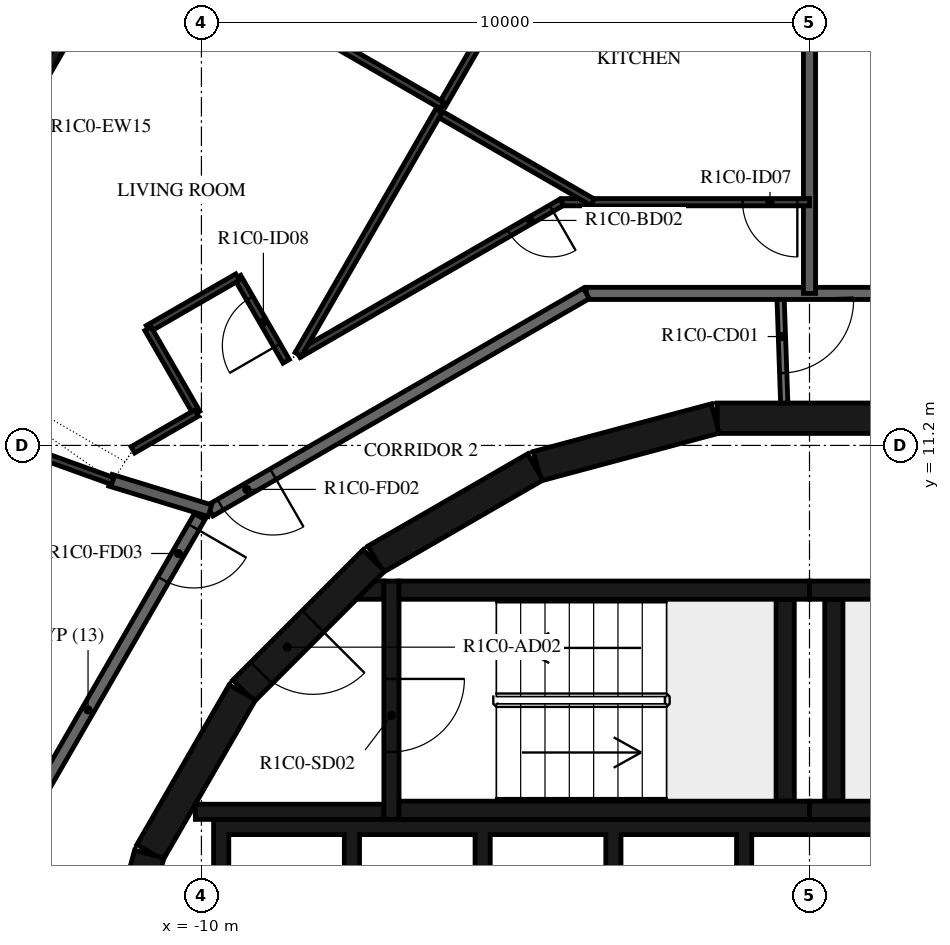
"""IFC4 building model, lengths in metres.
Left out: names, types, materials, properties, quantities, classifications, styles, units other than length and angle.
Written with IfcOpenShell. Run it as: python <this file> out.ifc"""

import sys

from ifc_helpers import new_model, si_unit, direction, frame, frame_2d, origin, place, context, subcontext, project, spatial, polyline, rectangle, outline, extrude, element, fill, save


model = new_model("IFC4")
c1 = context("Model", 3, precision=1e-05, world=origin(), true_north=direction((0.0, 1.0)))
c2 = subcontext(c1, "Body", "Model", "MODEL_VIEW")
j1 = project(units=[si_unit("LENGTHUNIT", "METRE"), si_unit("PLANEANGLEUNIT", "RADIAN")], contexts=[c1])
p1 = place(None, origin())
s1 = spatial("IfcSite", under=j1, at=p1, CompositionType="ELEMENT")
p2 = place(p1, origin())
s2 = spatial("IfcBuilding", under=s1, at=p2, CompositionType="ELEMENT")
p3 = place(p2, frame((0.0, 0.0, 66.4)))
s3 = spatial("IfcBuildingStorey", under=s2, at=p3, CompositionType="ELEMENT", Elevation=66.4)
p4 = place(p3, frame((-12.291, 17.812, 0.0), z_axis=(0.0, 0.0, 1.0), x_axis=(-0.499971222258, -0.866042017984, 0.0)))
e1 = element("IfcWall", 1, at=p4, inside=s3, PredefinedType="STANDARD", context=c2, shape_type="SweptSolid", body=[
    extrude(rectangle(XDim=3.2, YDim=0.16, at=frame_2d((1.6, 0.0))), origin(), (0.0, 0.0, 1.0), 3.05),
])
p5 = place(p4, frame((0.4, 0.0, 0.0)))
e2 = element("IfcOpeningElement", 2, at=p5, cuts=e1, PredefinedType="OPENING", context=c2, shape_type="SweptSolid", body=[
    extrude(rectangle(XDim=2.4, YDim=2.4, at=frame_2d((1.2, 1.2))), frame((0.0, 0.09, 0.0), z_axis=(0.0, -1.0, 0.0), x_axis=(1.0, 0.0, 0.0)), (0.0, 0.0, 1.0), 0.18),
])
for number, where, z_axis, x_axis in (
    (3, (1.516, 11.647, 0.0), (0.0, 0.0, 1.0), (-1.0, 0.0, 0.0)),
    (4, (-1.55, 11.643, 0.0), (0.0, 0.0, 1.0), (-0.966, -0.259, 0.0)),
    (5, (-4.51, 10.845, 0.0), (0.0, 0.0, 1.0), (-0.866, -0.5, 0.0)),
):
    element("IfcWall", number, at=place(p3, frame(where, z_axis=z_axis, x_axis=x_axis)), inside=s3, PredefinedType="SHEAR", context=c2, shape_type="SweptSolid", body=[
        extrude(rectangle(XDim=3.033, YDim=0.5, at=frame_2d((1.516, 0.0))), origin(), (0.0, 0.0, 1.0), 3.05),
    ])
p6 = place(p3, frame((-7.164, 9.308, 0.0), z_axis=(0.0, 0.0, 1.0), x_axis=(-0.707106781187, -0.707106781187, 0.0)))
e6 = element("IfcWall", 6, at=p6, inside=s3, PredefinedType="SHEAR", context=c2, shape_type="SweptSolid", body=[
    extrude(rectangle(XDim=3.032, YDim=0.5, at=frame_2d((1.516, 0.0))), origin(), (0.0, 0.0, 1.0), 3.05),
])
p7 = place(p6, frame((1.416, 0.0, 0.0)))
e7 = element("IfcOpeningElement", 7, at=p7, cuts=e6, PredefinedType="OPENING", context=c2, shape_type="SweptSolid", body=[
    extrude(rectangle(XDim=1.2, YDim=2.1, at=frame_2d((0.6, 1.05))), frame((0.0, 0.26, 0.0), z_axis=(0.0, -1.0, 0.0), x_axis=(1.0, 0.0, 0.0)), (0.0, 0.0, 1.0), 0.52),
])
for number, where, z_axis, x_axis in (
    (8, (-9.329, 7.137, 0.0), (0.0, 0.0, 1.0), (-0.5, -0.866, 0.0)),
    (9, (-10.858, 4.479, 0.0), (0.0, 0.0, 1.0), (-0.259, -0.966, 0.0)),
):
    element("IfcWall", number, at=place(p3, frame(where, z_axis=z_axis, x_axis=x_axis)), inside=s3, PredefinedType="SHEAR", context=c2, shape_type="SweptSolid", body=[
        extrude(rectangle(XDim=3.033, YDim=0.5, at=frame_2d((1.516, 0.0))), origin(), (0.0, 0.0, 1.0), 3.05),
    ])
for number, where, z_axis, x_axis in (
    (10, (0.0, 5.2, 0.0), (0.0, 0.0, 1.0), (1.0, 0.0, 0.0)),
    (11, (0.0, 8.82, 0.0), (0.0, 0.0, 1.0), (1.0, 0.0, 0.0)),
):
    element("IfcWall", number, at=place(p3, frame(where, z_axis=z_axis, x_axis=x_axis)), inside=s3, PredefinedType="SHEAR", context=c2, shape_type="SweptSolid", body=[
        extrude(rectangle(XDim=6.75, YDim=0.3, at=frame_2d((3.375, 0.0))), origin(), (0.0, 0.0, 1.0), 3.05),
    ])
p8 = place(p3, frame((0.4, 5.35, 0.0), z_axis=(0.0, 0.0, 1.0), x_axis=(0.0, 1.0, 0.0)))
e12 = element("IfcWall", 12, at=p8, inside=s3, PredefinedType="SHEAR", context=c2, shape_type="SweptSolid", body=[
    extrude(rectangle(XDim=3.32, YDim=0.3, at=frame_2d((1.66, 0.0))), origin(), (0.0, 0.0, 1.0), 3.05),
])
for number, where, z_axis, x_axis in (
    (13, (-6.75, 5.2, 0.0), (0.0, 0.0, 1.0), (1.0, 0.0, 0.0)),
    (14, (-6.75, 8.82, 0.0), (0.0, 0.0, 1.0), (1.0, 0.0, 0.0)),
):
    element("IfcWall", number, at=place(p3, frame(where, z_axis=z_axis, x_axis=x_axis)), inside=s3, PredefinedType="SHEAR", context=c2, shape_type="SweptSolid", body=[
        extrude(rectangle(XDim=6.75, YDim=0.3, at=frame_2d((3.375, 0.0))), origin(), (0.0, 0.0, 1.0), 3.05),
    ])
p9 = place(p3, frame((-0.4, 5.35, 0.0), z_axis=(0.0, 0.0, 1.0), x_axis=(0.0, 1.0, 0.0)))
e15 = element("IfcWall", 15, at=p9, inside=s3, PredefinedType="SHEAR", context=c2, shape_type="SweptSolid", body=[
    extrude(rectangle(XDim=3.32, YDim=0.3, at=frame_2d((1.66, 0.0))), origin(), (0.0, 0.0, 1.0), 3.05),
])
p10 = place(p3, frame((-6.875, 8.97, 0.0), z_axis=(0.0, 0.0, 1.0), x_axis=(0.0, -1.0, 0.0)))
e16 = element("IfcWall", 16, at=p10, inside=s3, PredefinedType="SHEAR", context=c2, shape_type="SweptSolid", body=[
    extrude(rectangle(XDim=3.92, YDim=0.25, at=frame_2d((1.96, 0.0))), origin(), (0.0, 0.0, 1.0), 3.05),
])
p11 = place(p10, frame((1.61, 0.0, 0.0)))
e17 = element("IfcOpeningElement", 17, at=p11, cuts=e16, PredefinedType="OPENING", context=c2, shape_type="SweptSolid", body=[
    extrude(rectangle(XDim=1.2, YDim=2.1, at=frame_2d((0.6, 1.05))), frame((0.0, 0.135, 0.0), z_axis=(0.0, -1.0, 0.0), x_axis=(1.0, 0.0, 0.0)), (0.0, 0.0, 1.0), 0.27),
])
p12 = place(p3, frame((-7.0, 5.175, 0.0), z_axis=(0.0, 0.0, 1.0), x_axis=(-1.0, 0.0, 0.0)))
e18 = element("IfcWall", 18, at=p12, inside=s3, PredefinedType="SHEAR", context=c2, shape_type="SweptSolid", body=[
    extrude(rectangle(XDim=3.1, YDim=0.25, at=frame_2d((1.55, 0.0))), origin(), (0.0, 0.0, 1.0), 3.05),
])
p13 = place(p3, origin())
e19 = element("IfcWall", 19, at=p13, inside=s3, PredefinedType="SHEAR", context=c2, shape_type="SweptSolid", body=[
    extrude(outline(polyline([(-7.148, 8.97), (-7.0, 8.97), (-7.0, 8.67), (-7.448, 8.67), (-7.148, 8.97)])), origin(), (0.0, 0.0, 1.0), 3.05),
])
p14 = place(p3, origin())
e20 = element("IfcWall", 20, at=p14, inside=s3, PredefinedType="SHEAR", context=c2, shape_type="SweptSolid", body=[
    extrude(outline(polyline([(-9.55, 4.8), (-7.65, 4.8), (-7.65, 1.9), (-7.4, 1.9), (-7.4, 4.8), (-5.5, 4.8), (-5.5, 1.9), (-5.25, 1.9), (-5.25, 4.8), (-3.35, 4.8), (-3.35, 1.9), (-3.1, 1.9), (-3.1, 4.8), (-1.2, 4.8), (-1.2, 1.9), (-0.95, 1.9), (-0.95, 4.8), (3.1, 4.8), (3.1, 1.9), (3.35, 1.9), (3.35, 4.8), (5.25, 4.8), (5.25, 1.9), (5.5, 1.9), (5.5, 4.8), (7.4, 4.8), (7.4, 1.9), (7.65, 1.9), (7.65, 4.8), (9.55, 4.8), (9.55, 1.9), (9.8, 1.9), (9.8, 4.8), (9.8, 5.05), (-9.8, 5.05), (-9.8, 4.8), (-9.8, 1.9), (-9.55, 1.9), (-9.55, 4.8)])), origin(), (0.0, 0.0, 1.0), 3.05),
])
p15 = place(p3, frame((-0.479, 13.7, 0.0), z_axis=(0.0, 0.0, 1.0), x_axis=(0.034919103017, -0.999390142159, 0.0)))
e21 = element("IfcWall", 21, at=p15, inside=s3, PredefinedType="PARTITIONING", context=c2, shape_type="SweptSolid", body=[
    extrude(rectangle(XDim=1.804, YDim=0.12, at=frame_2d((0.902, 0.0))), origin(), (0.0, 0.0, 1.0), 3.05),
])
p16 = place(p15, frame((0.11, 0.0, 0.0)))
e22 = element("IfcOpeningElement", 22, at=p16, cuts=e21, PredefinedType="OPENING", context=c2, shape_type="SweptSolid", body=[
    extrude(rectangle(XDim=1.2, YDim=2.1, at=frame_2d((0.6, 1.05))), frame((0.0, 0.07, 0.0), z_axis=(0.0, -1.0, 0.0), x_axis=(1.0, 0.0, 0.0)), (0.0, 0.0, 1.0), 0.14),
])
p17 = place(p3, frame((3.671, 13.7, 0.0), z_axis=(0.0, 0.0, 1.0), x_axis=(-1.0, 0.0, 0.0)))
e23 = element("IfcWall", 23, at=p17, inside=s3, PredefinedType="STANDARD", context=c2, shape_type="SweptSolid", body=[
    extrude(rectangle(XDim=7.342, YDim=0.2, at=frame_2d((3.671, 0.0))), origin(), (0.0, 0.0, 1.0), 3.05),
])
p18 = place(p3, frame((-3.671, 13.7, 0.0), z_axis=(0.0, 0.0, 1.0), x_axis=(-0.866031419417, -0.499989580474, 0.0)))
e24 = element("IfcWall", 24, at=p18, inside=s3, PredefinedType="STANDARD", context=c2, shape_type="SweptSolid", body=[
    extrude(rectangle(XDim=7.147, YDim=0.2, at=frame_2d((3.573, 0.0))), origin(), (0.0, 0.0, 1.0), 3.05),
])
p19 = place(p18, frame((5.947, 0.0, 0.0)))
e25 = element("IfcOpeningElement", 25, at=p19, cuts=e24, PredefinedType="OPENING", context=c2, shape_type="SweptSolid", body=[
    extrude(rectangle(XDim=1.0, YDim=2.1, at=frame_2d((0.5, 1.05))), frame((0.0, 0.11, 0.0), z_axis=(0.0, -1.0, 0.0), x_axis=(1.0, 0.0, 0.0)), (0.0, 0.0, 1.0), 0.22),
])
p20 = place(p3, frame((-10.029, 10.029, 0.0), z_axis=(0.0, 0.0, 1.0), x_axis=(-0.500001669485, -0.866024439905, 0.0)))
e26 = element("IfcWall", 26, at=p20, inside=s3, PredefinedType="STANDARD", context=c2, shape_type="SweptSolid", body=[
    extrude(rectangle(XDim=7.342, YDim=0.2, at=frame_2d((3.671, 0.0))), origin(), (0.0, 0.0, 1.0), 3.05),
])
p21 = place(p20, frame((0.2, 0.0, 0.0)))
e27 = element("IfcOpeningElement", 27, at=p21, cuts=e26, PredefinedType="OPENING", context=c2, shape_type="SweptSolid", body=[
    extrude(rectangle(XDim=1.0, YDim=2.1, at=frame_2d((0.5, 1.05))), frame((0.0, 0.11, 0.0), z_axis=(0.0, -1.0, 0.0), x_axis=(1.0, 0.0, 0.0)), (0.0, 0.0, 1.0), 0.22),
])
p22 = place(p3, frame((0.0, 18.437, 0.0), z_axis=(0.0, 0.0, 1.0), x_axis=(0.0, -1.0, 0.0)))
e28 = element("IfcWall", 28, at=p22, inside=s3, PredefinedType="STANDARD", context=c2, shape_type="SweptSolid", body=[
    extrude(rectangle(XDim=4.737, YDim=0.2, at=frame_2d((2.368, 0.0))), origin(), (0.0, 0.0, 1.0), 3.05),
])
p23 = place(p3, frame((-11.496, 10.627, 0.0), z_axis=(0.0, 0.0, 1.0), x_axis=(0.956240708563, -0.292581112321, 0.0)))
e29 = element("IfcWall", 29, at=p23, inside=s3, PredefinedType="STANDARD", context=c2, shape_type="SweptSolid", body=[
    extrude(rectangle(XDim=1.711, YDim=0.2, at=frame_2d((0.855, 0.0))), origin(), (0.0, 0.0, 1.0), 3.05),
])
p24 = place(p3, frame((0.0, 15.2, 0.0), z_axis=(0.0, 0.0, 1.0), x_axis=(-1.0, 0.0, 0.0)))
e30 = element("IfcWall", 30, at=p24, inside=s3, PredefinedType="PARTITIONING", context=c2, shape_type="SweptSolid", body=[
    extrude(rectangle(XDim=4.073, YDim=0.12, at=frame_2d((2.036, 0.0))), origin(), (0.0, 0.0, 1.0), 3.05),
])
p25 = place(p24, frame((0.2, 0.0, 0.0)))
e31 = element("IfcOpeningElement", 31, at=p25, cuts=e30, PredefinedType="OPENING", context=c2, shape_type="SweptSolid", body=[
    extrude(rectangle(XDim=0.9, YDim=2.1, at=frame_2d((0.45, 1.05))), frame((0.0, 0.07, 0.0), z_axis=(0.0, -1.0, 0.0), x_axis=(1.0, 0.0, 0.0)), (0.0, 0.0, 1.0), 0.14),
])
p26 = place(p3, frame((-4.073, 15.2, 0.0), z_axis=(0.0, 0.0, 1.0), x_axis=(-0.866034514313, -0.499984219769, 0.0)))
e32 = element("IfcWall", 32, at=p26, inside=s3, PredefinedType="PARTITIONING", context=c2, shape_type="SweptSolid", body=[
    extrude(rectangle(XDim=5.006, YDim=0.12, at=frame_2d((2.503, 0.0))), origin(), (0.0, 0.0, 1.0), 3.05),
])
p27 = place(p26, frame((0.2, 0.0, 0.0)))
e33 = element("IfcOpeningElement", 33, at=p27, cuts=e32, PredefinedType="OPENING", context=c2, shape_type="SweptSolid", body=[
    extrude(rectangle(XDim=0.8, YDim=2.1, at=frame_2d((0.4, 1.05))), frame((0.0, 0.07, 0.0), z_axis=(0.0, -1.0, 0.0), x_axis=(1.0, 0.0, 0.0)), (0.0, 0.0, 1.0), 0.14),
])
p28 = place(p3, frame((-8.606, 12.583, 0.0), z_axis=(0.0, 0.0, 1.0), x_axis=(-0.499995408039, 0.866028054938, 0.0)))
e34 = element("IfcWall", 34, at=p28, inside=s3, PredefinedType="PARTITIONING", context=c2, shape_type="SweptSolid", body=[
    extrude(rectangle(XDim=1.6, YDim=0.12, at=frame_2d((0.8, 0.0))), origin(), (0.0, 0.0, 1.0), 3.05),
])
p29 = place(p28, frame((0.3, 0.0, 0.0)))
e35 = element("IfcOpeningElement", 35, at=p29, cuts=e34, PredefinedType="OPENING", context=c2, shape_type="SweptSolid", body=[
    extrude(rectangle(XDim=0.9, YDim=2.1, at=frame_2d((0.45, 1.05))), frame((0.0, 0.07, 0.0), z_axis=(0.0, -1.0, 0.0), x_axis=(1.0, 0.0, 0.0)), (0.0, 0.0, 1.0), 0.14),
])
p30 = place(p3, frame((-9.406, 13.969, 0.0), z_axis=(0.0, 0.0, 1.0), x_axis=(-0.865989465428, -0.500062241894, 0.0)))
e36 = element("IfcWall", 36, at=p30, inside=s3, PredefinedType="PARTITIONING", context=c2, shape_type="SweptSolid", body=[
    extrude(rectangle(XDim=1.7, YDim=0.12, at=frame_2d((0.85, 0.0))), origin(), (0.0, 0.0, 1.0), 3.05),
])
p31 = place(p3, frame((-10.878, 13.118, 0.0), z_axis=(0.0, 0.0, 1.0), x_axis=(0.500061482766, -0.865989903783, 0.0)))
e37 = element("IfcWall", 37, at=p31, inside=s3, PredefinedType="PARTITIONING", context=c2, shape_type="SweptSolid", body=[
    extrude(rectangle(XDim=1.6, YDim=0.12, at=frame_2d((0.8, 0.0))), origin(), (0.0, 0.0, 1.0), 3.05),
])
p32 = place(p3, frame((-10.078, 11.733, 0.0), z_axis=(0.0, 0.0, 1.0), x_axis=(-0.866014416983, -0.500019029215, 0.0)))
e38 = element("IfcWall", 38, at=p32, inside=s3, PredefinedType="PARTITIONING", context=c2, shape_type="SweptSolid", body=[
    extrude(rectangle(XDim=1.211, YDim=0.12, at=frame_2d((0.606, 0.0))), origin(), (0.0, 0.0, 1.0), 3.05),
])
p33 = place(p3, frame((-1.907, 23.957, 0.0), z_axis=(0.0, 0.0, 1.0), x_axis=(-0.499994901178, -0.866028347571, 0.0)))
e39 = element("IfcWall", 39, at=p33, inside=s3, PredefinedType="PARTITIONING", context=c2, shape_type="SweptSolid", body=[
    extrude(rectangle(XDim=8.274, YDim=0.12, at=frame_2d((4.137, 0.0))), origin(), (0.0, 0.0, 1.0), 3.05),
])
p34 = place(p33, frame((4.387, 0.0, 0.0)))
e40 = element("IfcOpeningElement", 40, at=p34, cuts=e39, PredefinedType="OPENING", context=c2, shape_type="SweptSolid", body=[
    extrude(rectangle(XDim=0.9, YDim=2.1, at=frame_2d((0.45, 1.05))), frame((0.0, 0.07, 0.0), z_axis=(0.0, -1.0, 0.0), x_axis=(1.0, 0.0, 0.0)), (0.0, 0.0, 1.0), 0.14),
])
p35 = place(p3, frame((-6.114, 16.67, 0.0), z_axis=(0.0, 0.0, 1.0), x_axis=(0.866011328839, -0.500024377727, 0.0)))
e41 = element("IfcWall", 41, at=p35, inside=s3, PredefinedType="PARTITIONING", context=c2, shape_type="SweptSolid", body=[
    extrude(rectangle(XDim=2.94, YDim=0.12, at=frame_2d((1.47, 0.0))), origin(), (0.0, 0.0, 1.0), 3.05),
])
p36 = place(p3, frame((-11.24, 19.792, 0.0), z_axis=(0.0, 0.0, 1.0), x_axis=(0.866031096941, -0.499990139034, 0.0)))
e42 = element("IfcWall", 42, at=p36, inside=s3, PredefinedType="PARTITIONING", context=c2, shape_type="SweptSolid", body=[
    extrude(rectangle(XDim=6.0, YDim=0.12, at=frame_2d((3.0, 0.0))), origin(), (0.0, 0.0, 1.0), 3.05),
])
p37 = place(p3, frame((-6.094, 16.705, 0.0), z_axis=(0.0, 0.0, 1.0), x_axis=(-0.500014747178, -0.86601688933, 0.0)))
e43 = element("IfcWall", 43, at=p37, inside=s3, PredefinedType="PARTITIONING", context=c2, shape_type="SweptSolid", body=[
    extrude(rectangle(XDim=4.627, YDim=0.12, at=frame_2d((2.313, 0.0))), origin(), (0.0, 0.0, 1.0), 3.05),
])
p38 = place(p3, frame((-11.458, 10.614, 0.0), z_axis=(0.0, 0.0, 1.0), x_axis=(-0.941092440198, 0.338149403375, 0.0)))
e44 = element("IfcWall", 44, at=p38, inside=s3, PredefinedType="PARTITIONING", context=c2, shape_type="SweptSolid", body=[
    extrude(rectangle(XDim=2.123, YDim=0.12, at=frame_2d((1.062, 0.0))), origin(), (0.0, 0.0, 1.0), 3.05),
])
p39 = place(p11, origin())
e45 = element("IfcDoor", 45, at=p39, inside=s3, OperationType="SINGLE_SWING_LEFT", PredefinedType="DOOR", context=c2, shape_type="SweptSolid", body=[
    extrude(rectangle(XDim=1.2, YDim=2.1, at=frame_2d((0.6, 1.05))), frame((0.0, 0.025, 0.0), z_axis=(0.0, -1.0, 0.0), x_axis=(1.0, 0.0, 0.0)), (0.0, 0.0, 1.0), 0.05),
])
fill(e17, e45)
p40 = place(p7, origin())
e46 = element("IfcDoor", 46, at=p40, inside=s3, OperationType="SINGLE_SWING_RIGHT", PredefinedType="DOOR", context=c2, shape_type="SweptSolid", body=[
    extrude(rectangle(XDim=1.2, YDim=2.1, at=frame_2d((0.6, 1.05))), frame((0.0, 0.025, 0.0), z_axis=(0.0, -1.0, 0.0), x_axis=(1.0, 0.0, 0.0)), (0.0, 0.0, 1.0), 0.05),
])
fill(e7, e46)
p41 = place(p19, origin())
e47 = element("IfcDoor", 47, at=p41, inside=s3, OperationType="SINGLE_SWING_LEFT", PredefinedType="DOOR", context=c2, shape_type="SweptSolid", body=[
    extrude(rectangle(XDim=1.0, YDim=2.1, at=frame_2d((0.5, 1.05))), frame((0.0, 0.025, 0.0), z_axis=(0.0, -1.0, 0.0), x_axis=(1.0, 0.0, 0.0)), (0.0, 0.0, 1.0), 0.05),
])
fill(e25, e47)
p42 = place(p25, origin())
e48 = element("IfcDoor", 48, at=p42, inside=s3, OperationType="SINGLE_SWING_RIGHT", PredefinedType="DOOR", context=c2, shape_type="SweptSolid", body=[
    extrude(rectangle(XDim=0.9, YDim=2.1, at=frame_2d((0.45, 1.05))), frame((0.0, 0.025, 0.0), z_axis=(0.0, -1.0, 0.0), x_axis=(1.0, 0.0, 0.0)), (0.0, 0.0, 1.0), 0.05),
])
fill(e31, e48)
p43 = place(p27, origin())
e49 = element("IfcDoor", 49, at=p43, inside=s3, OperationType="SINGLE_SWING_LEFT", PredefinedType="DOOR", context=c2, shape_type="SweptSolid", body=[
    extrude(rectangle(XDim=0.8, YDim=2.1, at=frame_2d((0.4, 1.05))), frame((0.0, 0.025, 0.0), z_axis=(0.0, -1.0, 0.0), x_axis=(1.0, 0.0, 0.0)), (0.0, 0.0, 1.0), 0.05),
])
fill(e33, e49)
p44 = place(p29, origin())
e50 = element("IfcDoor", 50, at=p44, inside=s3, OperationType="SINGLE_SWING_RIGHT", PredefinedType="DOOR", context=c2, shape_type="SweptSolid", body=[
    extrude(rectangle(XDim=0.9, YDim=2.1, at=frame_2d((0.45, 1.05))), frame((0.0, 0.025, 0.0), z_axis=(0.0, -1.0, 0.0), x_axis=(1.0, 0.0, 0.0)), (0.0, 0.0, 1.0), 0.05),
])
fill(e35, e50)
p45 = place(p21, origin())
e51 = element("IfcDoor", 51, at=p45, inside=s3, OperationType="SINGLE_SWING_LEFT", PredefinedType="DOOR", context=c2, shape_type="SweptSolid", body=[
    extrude(rectangle(XDim=1.0, YDim=2.1, at=frame_2d((0.5, 1.05))), frame((0.0, 0.025, 0.0), z_axis=(0.0, -1.0, 0.0), x_axis=(1.0, 0.0, 0.0)), (0.0, 0.0, 1.0), 0.05),
])
fill(e27, e51)
p46 = place(p16, origin())
e52 = element("IfcDoor", 52, at=p46, inside=s3, OperationType="DOUBLE_DOOR_SINGLE_SWING", PredefinedType="DOOR", context=c2, shape_type="SweptSolid", body=[
    extrude(rectangle(XDim=1.2, YDim=2.1, at=frame_2d((0.6, 1.05))), frame((0.0, 0.025, 0.0), z_axis=(0.0, -1.0, 0.0), x_axis=(1.0, 0.0, 0.0)), (0.0, 0.0, 1.0), 0.05),
])
fill(e22, e52)
save(model, sys.argv[1])
